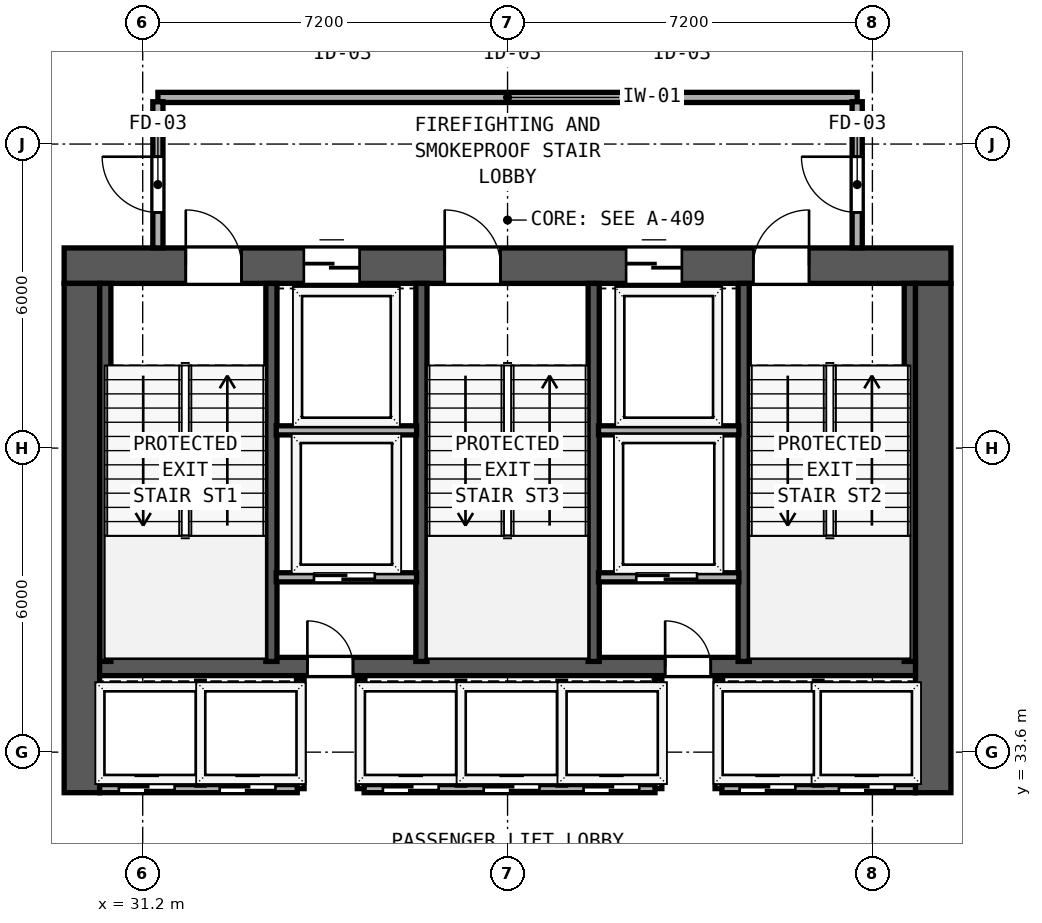
"""IFC4 building model, lengths in metres.
Left out: names, types, materials, properties, quantities, classifications, styles, units other than length and angle.
Written with IfcOpenShell. Run it as: python <this file> out.ifc"""

import sys

from ifc_helpers import new_model, si_unit, direction, frame, frame_2d, origin, place, context, subcontext, project, spatial, rectangle, extrude, element, fill, save


model = new_model("IFC4")
c1 = context("Model", 3, precision=1e-05, world=origin(), true_north=direction((0.0, 1.0)))
c2 = subcontext(c1, "Body", "Model", "MODEL_VIEW")
j1 = project(units=[si_unit("LENGTHUNIT", "METRE"), si_unit("PLANEANGLEUNIT", "RADIAN")], contexts=[c1])
p1 = place(None, origin())
s1 = spatial("IfcSite", under=j1, at=p1, CompositionType="ELEMENT")
p2 = place(p1, origin())
s2 = spatial("IfcBuilding", under=s1, at=p2, CompositionType="ELEMENT")
p3 = place(p2, frame((0.0, 0.0, 94.0)))
s3 = spatial("IfcBuildingStorey", under=s2, at=p3, CompositionType="ELEMENT", Elevation=94.0)
p4 = place(p3, frame((29.65, 43.2, 0.0), z_axis=(0.0, 0.0, 1.0), x_axis=(1.0, 0.0, 0.0)))
e1 = element("IfcWall", 1, at=p4, inside=s3, PredefinedType="SHEAR", context=c2, shape_type="SweptSolid", body=[
    extrude(rectangle(XDim=17.5, YDim=0.7, at=frame_2d((8.75, 0.0))), origin(), (0.0, 0.0, 1.0), 4.2),
])
p5 = place(p4, frame((2.4, 0.0, 0.0)))
e2 = element("IfcOpeningElement", 2, at=p5, cuts=e1, PredefinedType="OPENING", context=c2, shape_type="SweptSolid", body=[
    extrude(rectangle(XDim=1.1, YDim=2.15, at=frame_2d((0.55, 1.075))), frame((0.0, 0.36, 0.0), z_axis=(0.0, -1.0, 0.0), x_axis=(1.0, 0.0, 0.0)), (0.0, 0.0, 1.0), 0.72),
])
p6 = place(p4, frame((7.51, 0.0, 0.0)))
e3 = element("IfcOpeningElement", 3, at=p6, cuts=e1, PredefinedType="OPENING", context=c2, shape_type="SweptSolid", body=[
    extrude(rectangle(XDim=1.1, YDim=2.15, at=frame_2d((0.55, 1.075))), frame((0.0, 0.36, 0.0), z_axis=(0.0, -1.0, 0.0), x_axis=(1.0, 0.0, 0.0)), (0.0, 0.0, 1.0), 0.72),
])
p7 = place(p4, frame((13.6, 0.0, 0.0)))
e4 = element("IfcOpeningElement", 4, at=p7, cuts=e1, PredefinedType="OPENING", context=c2, shape_type="SweptSolid", body=[
    extrude(rectangle(XDim=1.1, YDim=2.15, at=frame_2d((0.55, 1.075))), frame((0.0, 0.36, 0.0), z_axis=(0.0, -1.0, 0.0), x_axis=(1.0, 0.0, 0.0)), (0.0, 0.0, 1.0), 0.72),
])
p8 = place(p4, frame((4.73, 0.0, 0.0)))
e5 = element("IfcOpeningElement", 5, at=p8, cuts=e1, PredefinedType="OPENING", context=c2, shape_type="SweptSolid", body=[
    extrude(rectangle(XDim=1.1, YDim=2.2, at=frame_2d((0.55, 1.1))), frame((0.0, 0.36, 0.0), z_axis=(0.0, -1.0, 0.0), x_axis=(1.0, 0.0, 0.0)), (0.0, 0.0, 1.0), 0.72),
])
p9 = place(p4, frame((11.09, 0.0, 0.0)))
e6 = element("IfcOpeningElement", 6, at=p9, cuts=e1, PredefinedType="OPENING", context=c2, shape_type="SweptSolid", body=[
    extrude(rectangle(XDim=1.1, YDim=2.2, at=frame_2d((0.55, 1.1))), frame((0.0, 0.36, 0.0), z_axis=(0.0, -1.0, 0.0), x_axis=(1.0, 0.0, 0.0)), (0.0, 0.0, 1.0), 0.72),
])
for number, where, z_axis, x_axis in (
    (7, (30.0, 32.8, 0.0), (0.0, 0.0, 1.0), (0.0, 1.0, 0.0)),
    (8, (46.8, 32.8, 0.0), (0.0, 0.0, 1.0), (0.0, 1.0, 0.0)),
):
    element("IfcWall", number, at=place(p3, frame(where, z_axis=z_axis, x_axis=x_axis)), inside=s3, PredefinedType="SHEAR", context=c2, shape_type="SweptSolid", body=[
        extrude(rectangle(XDim=10.05, YDim=0.7, at=frame_2d((5.025, 0.0))), origin(), (0.0, 0.0, 1.0), 4.2),
    ])
p10 = place(p3, frame((30.35, 35.29, 0.0), z_axis=(0.0, 0.0, 1.0), x_axis=(1.0, 0.0, 0.0)))
e9 = element("IfcWall", 9, at=p10, inside=s3, PredefinedType="SHEAR", context=c2, shape_type="SweptSolid", body=[
    extrude(rectangle(XDim=16.1, YDim=0.36, at=frame_2d((8.05, 0.0))), origin(), (0.0, 0.0, 1.0), 4.2),
])
p11 = place(p10, frame((5.0, 0.0, 0.0), z_axis=(0.0, 0.0, 1.0), x_axis=(-1.0, 0.0, 0.0)))
e10 = element("IfcOpeningElement", 10, at=p11, cuts=e9, PredefinedType="OPENING", context=c2, shape_type="SweptSolid", body=[
    extrude(rectangle(XDim=0.9, YDim=2.1, at=frame_2d((0.45, 1.05))), frame((0.0, 0.19, 0.0), z_axis=(0.0, -1.0, 0.0), x_axis=(1.0, 0.0, 0.0)), (0.0, 0.0, 1.0), 0.38),
])
p12 = place(p10, frame((12.06, 0.0, 0.0), z_axis=(0.0, 0.0, 1.0), x_axis=(-1.0, 0.0, 0.0)))
e11 = element("IfcOpeningElement", 11, at=p12, cuts=e9, PredefinedType="OPENING", context=c2, shape_type="SweptSolid", body=[
    extrude(rectangle(XDim=0.9, YDim=2.1, at=frame_2d((0.45, 1.05))), frame((0.0, 0.19, 0.0), z_axis=(0.0, -1.0, 0.0), x_axis=(1.0, 0.0, 0.0)), (0.0, 0.0, 1.0), 0.38),
])
for number, where, z_axis, x_axis in (
    (12, (30.462, 35.39, 0.0), (0.0, 0.0, 1.0), (0.0, 1.0, 0.0)),
    (13, (33.74, 35.39, 0.0), (0.0, 0.0, 1.0), (0.0, 1.0, 0.0)),
    (14, (36.7, 35.39, 0.0), (0.0, 0.0, 1.0), (0.0, 1.0, 0.0)),
    (15, (40.1, 35.39, 0.0), (0.0, 0.0, 1.0), (0.0, 1.0, 0.0)),
    (16, (43.06, 35.39, 0.0), (0.0, 0.0, 1.0), (0.0, 1.0, 0.0)),
    (17, (46.338, 35.39, 0.0), (0.0, 0.0, 1.0), (0.0, 1.0, 0.0)),
):
    element("IfcWall", number, at=place(p3, frame(where, z_axis=z_axis, x_axis=x_axis)), inside=s3, PredefinedType="SHEAR", context=c2, shape_type="SweptSolid", body=[
        extrude(rectangle(XDim=7.46, YDim=0.22, at=frame_2d((3.73, 0.0))), origin(), (0.0, 0.0, 1.0), 4.2),
    ])
p13 = place(p3, frame((31.5, 46.52, 0.0), z_axis=(0.0, 0.0, 1.0), x_axis=(1.0, 0.0, 0.0)))
e18 = element("IfcWall", 18, at=p13, inside=s3, PredefinedType="SOLIDWALL", context=c2, shape_type="SweptSolid", body=[
    extrude(rectangle(XDim=13.8, YDim=0.2, at=frame_2d((6.9, 0.0))), origin(), (0.0, 0.0, 1.0), 4.2),
])
p14 = place(p3, frame((31.5, 43.55, 0.0), z_axis=(0.0, 0.0, 1.0), x_axis=(0.0, 1.0, 0.0)))
e19 = element("IfcWall", 19, at=p14, inside=s3, PredefinedType="SOLIDWALL", context=c2, shape_type="SweptSolid", body=[
    extrude(rectangle(XDim=2.885, YDim=0.2, at=frame_2d((1.442, 0.0))), origin(), (0.0, 0.0, 1.0), 4.2),
])
p15 = place(p14, frame((1.8, 0.0, 0.0), z_axis=(0.0, 0.0, 1.0), x_axis=(-1.0, 0.0, 0.0)))
e20 = element("IfcOpeningElement", 20, at=p15, cuts=e19, PredefinedType="OPENING", context=c2, shape_type="SweptSolid", body=[
    extrude(rectangle(XDim=1.1, YDim=2.15, at=frame_2d((0.55, 1.075))), frame((0.0, 0.11, 0.0), z_axis=(0.0, -1.0, 0.0), x_axis=(1.0, 0.0, 0.0)), (0.0, 0.0, 1.0), 0.22),
])
p16 = place(p3, frame((45.3, 43.55, 0.0), z_axis=(0.0, 0.0, 1.0), x_axis=(0.0, 1.0, 0.0)))
e21 = element("IfcWall", 21, at=p16, inside=s3, PredefinedType="SOLIDWALL", context=c2, shape_type="SweptSolid", body=[
    extrude(rectangle(XDim=2.885, YDim=0.2, at=frame_2d((1.442, 0.0))), origin(), (0.0, 0.0, 1.0), 4.2),
])
p17 = place(p16, frame((0.7, 0.0, 0.0)))
e22 = element("IfcOpeningElement", 22, at=p17, cuts=e21, PredefinedType="OPENING", context=c2, shape_type="SweptSolid", body=[
    extrude(rectangle(XDim=1.1, YDim=2.15, at=frame_2d((0.55, 1.075))), frame((0.0, 0.11, 0.0), z_axis=(0.0, -1.0, 0.0), x_axis=(1.0, 0.0, 0.0)), (0.0, 0.0, 1.0), 0.22),
])
for number, where, z_axis, x_axis in (
    (23, (33.835, 39.95, 0.0), (0.0, 0.0, 1.0), (1.0, 0.0, 0.0)),
    (24, (40.195, 39.95, 0.0), (0.0, 0.0, 1.0), (1.0, 0.0, 0.0)),
):
    element("IfcWall", number, at=place(p3, frame(where, z_axis=z_axis, x_axis=x_axis)), inside=s3, PredefinedType="SOLIDWALL", context=c2, shape_type="SweptSolid", body=[
        extrude(rectangle(XDim=2.77, YDim=0.18, at=frame_2d((1.385, 0.0))), origin(), (0.0, 0.0, 1.0), 4.2),
    ])
p18 = place(p3, frame((33.835, 37.05, 0.0), z_axis=(0.0, 0.0, 1.0), x_axis=(1.0, 0.0, 0.0)))
e25 = element("IfcWall", 25, at=p18, inside=s3, PredefinedType="SOLIDWALL", context=c2, shape_type="SweptSolid", body=[
    extrude(rectangle(XDim=2.77, YDim=0.18, at=frame_2d((1.385, 0.0))), origin(), (0.0, 0.0, 1.0), 4.2),
])
p19 = place(p18, frame((1.945, 0.0, 0.0), z_axis=(0.0, 0.0, 1.0), x_axis=(-1.0, 0.0, 0.0)))
e26 = element("IfcOpeningElement", 26, at=p19, cuts=e25, PredefinedType="OPENING", context=c2, shape_type="SweptSolid", body=[
    extrude(rectangle(XDim=1.2, YDim=2.2, at=frame_2d((0.6, 1.1))), frame((0.0, 0.1, 0.0), z_axis=(0.0, -1.0, 0.0), x_axis=(1.0, 0.0, 0.0)), (0.0, 0.0, 1.0), 0.2),
])
for number, where, z_axis, x_axis in (
    (27, (34.31, 32.88, 0.0), (0.0, 0.0, 1.0), (0.0, 1.0, 0.0)),
    (28, (35.51, 32.88, 0.0), (0.0, 0.0, 1.0), (0.0, 1.0, 0.0)),
):
    element("IfcWall", number, at=place(p3, frame(where, z_axis=z_axis, x_axis=x_axis)), inside=s3, PredefinedType="SOLIDWALL", context=c2, shape_type="SweptSolid", body=[
        extrude(rectangle(XDim=2.17, YDim=0.15, at=frame_2d((1.085, 0.0))), origin(), (0.0, 0.0, 1.0), 4.2),
    ])
p20 = place(p3, frame((40.195, 37.05, 0.0), z_axis=(0.0, 0.0, 1.0), x_axis=(1.0, 0.0, 0.0)))
e29 = element("IfcWall", 29, at=p20, inside=s3, PredefinedType="SOLIDWALL", context=c2, shape_type="SweptSolid", body=[
    extrude(rectangle(XDim=2.77, YDim=0.18, at=frame_2d((1.385, 0.0))), origin(), (0.0, 0.0, 1.0), 4.2),
])
p21 = place(p20, frame((1.945, 0.0, 0.0), z_axis=(0.0, 0.0, 1.0), x_axis=(-1.0, 0.0, 0.0)))
e30 = element("IfcOpeningElement", 30, at=p21, cuts=e29, PredefinedType="OPENING", context=c2, shape_type="SweptSolid", body=[
    extrude(rectangle(XDim=1.2, YDim=2.2, at=frame_2d((0.6, 1.1))), frame((0.0, 0.1, 0.0), z_axis=(0.0, -1.0, 0.0), x_axis=(1.0, 0.0, 0.0)), (0.0, 0.0, 1.0), 0.2),
])
for number, where, z_axis, x_axis in (
    (31, (41.37, 32.88, 0.0), (0.0, 0.0, 1.0), (0.0, 1.0, 0.0)),
    (32, (42.57, 32.88, 0.0), (0.0, 0.0, 1.0), (0.0, 1.0, 0.0)),
):
    element("IfcWall", number, at=place(p3, frame(where, z_axis=z_axis, x_axis=x_axis)), inside=s3, PredefinedType="SOLIDWALL", context=c2, shape_type="SweptSolid", body=[
        extrude(rectangle(XDim=2.17, YDim=0.15, at=frame_2d((1.085, 0.0))), origin(), (0.0, 0.0, 1.0), 4.2),
    ])
p22 = place(p3, frame((30.35, 32.88, 0.0), z_axis=(0.0, 0.0, 1.0), x_axis=(1.0, 0.0, 0.0)))
e33 = element("IfcWall", 33, at=p22, inside=s3, PredefinedType="SOLIDWALL", context=c2, shape_type="SweptSolid", body=[
    extrude(rectangle(XDim=3.9, YDim=0.16, at=frame_2d((1.95, 0.0))), origin(), (0.0, 0.0, 1.0), 4.2),
])
p23 = place(p22, frame((1.48, 0.0, 0.0), z_axis=(0.0, 0.0, 1.0), x_axis=(-1.0, 0.0, 0.0)))
e34 = element("IfcOpeningElement", 34, at=p23, cuts=e33, PredefinedType="OPENING", context=c2, shape_type="SweptSolid", body=[
    extrude(rectangle(XDim=1.1, YDim=2.2, at=frame_2d((0.55, 1.1))), frame((0.0, 0.09, 0.0), z_axis=(0.0, -1.0, 0.0), x_axis=(1.0, 0.0, 0.0)), (0.0, 0.0, 1.0), 0.18),
])
p24 = place(p22, frame((3.47, 0.0, 0.0), z_axis=(0.0, 0.0, 1.0), x_axis=(-1.0, 0.0, 0.0)))
e35 = element("IfcOpeningElement", 35, at=p24, cuts=e33, PredefinedType="OPENING", context=c2, shape_type="SweptSolid", body=[
    extrude(rectangle(XDim=1.1, YDim=2.2, at=frame_2d((0.55, 1.1))), frame((0.0, 0.09, 0.0), z_axis=(0.0, -1.0, 0.0), x_axis=(1.0, 0.0, 0.0)), (0.0, 0.0, 1.0), 0.18),
])
p25 = place(p3, frame((35.57, 32.88, 0.0), z_axis=(0.0, 0.0, 1.0), x_axis=(1.0, 0.0, 0.0)))
e36 = element("IfcWall", 36, at=p25, inside=s3, PredefinedType="SOLIDWALL", context=c2, shape_type="SweptSolid", body=[
    extrude(rectangle(XDim=5.74, YDim=0.16, at=frame_2d((2.87, 0.0))), origin(), (0.0, 0.0, 1.0), 4.2),
])
p26 = place(p25, frame((1.47, 0.0, 0.0), z_axis=(0.0, 0.0, 1.0), x_axis=(-1.0, 0.0, 0.0)))
e37 = element("IfcOpeningElement", 37, at=p26, cuts=e36, PredefinedType="OPENING", context=c2, shape_type="SweptSolid", body=[
    extrude(rectangle(XDim=1.1, YDim=2.2, at=frame_2d((0.55, 1.1))), frame((0.0, 0.09, 0.0), z_axis=(0.0, -1.0, 0.0), x_axis=(1.0, 0.0, 0.0)), (0.0, 0.0, 1.0), 0.18),
])
p27 = place(p25, frame((3.46, 0.0, 0.0), z_axis=(0.0, 0.0, 1.0), x_axis=(-1.0, 0.0, 0.0)))
e38 = element("IfcOpeningElement", 38, at=p27, cuts=e36, PredefinedType="OPENING", context=c2, shape_type="SweptSolid", body=[
    extrude(rectangle(XDim=1.1, YDim=2.2, at=frame_2d((0.55, 1.1))), frame((0.0, 0.09, 0.0), z_axis=(0.0, -1.0, 0.0), x_axis=(1.0, 0.0, 0.0)), (0.0, 0.0, 1.0), 0.18),
])
p28 = place(p25, frame((5.43, 0.0, 0.0), z_axis=(0.0, 0.0, 1.0), x_axis=(-1.0, 0.0, 0.0)))
e39 = element("IfcOpeningElement", 39, at=p28, cuts=e36, PredefinedType="OPENING", context=c2, shape_type="SweptSolid", body=[
    extrude(rectangle(XDim=1.1, YDim=2.2, at=frame_2d((0.55, 1.1))), frame((0.0, 0.09, 0.0), z_axis=(0.0, -1.0, 0.0), x_axis=(1.0, 0.0, 0.0)), (0.0, 0.0, 1.0), 0.18),
])
p29 = place(p3, frame((42.63, 32.88, 0.0), z_axis=(0.0, 0.0, 1.0), x_axis=(1.0, 0.0, 0.0)))
e40 = element("IfcWall", 40, at=p29, inside=s3, PredefinedType="SOLIDWALL", context=c2, shape_type="SweptSolid", body=[
    extrude(rectangle(XDim=3.82, YDim=0.16, at=frame_2d((1.91, 0.0))), origin(), (0.0, 0.0, 1.0), 4.2),
])
p30 = place(p29, frame((1.45, 0.0, 0.0), z_axis=(0.0, 0.0, 1.0), x_axis=(-1.0, 0.0, 0.0)))
e41 = element("IfcOpeningElement", 41, at=p30, cuts=e40, PredefinedType="OPENING", context=c2, shape_type="SweptSolid", body=[
    extrude(rectangle(XDim=1.1, YDim=2.2, at=frame_2d((0.55, 1.1))), frame((0.0, 0.09, 0.0), z_axis=(0.0, -1.0, 0.0), x_axis=(1.0, 0.0, 0.0)), (0.0, 0.0, 1.0), 0.18),
])
p31 = place(p29, frame((3.41, 0.0, 0.0), z_axis=(0.0, 0.0, 1.0), x_axis=(-1.0, 0.0, 0.0)))
e42 = element("IfcOpeningElement", 42, at=p31, cuts=e40, PredefinedType="OPENING", context=c2, shape_type="SweptSolid", body=[
    extrude(rectangle(XDim=1.1, YDim=2.2, at=frame_2d((0.55, 1.1))), frame((0.0, 0.09, 0.0), z_axis=(0.0, -1.0, 0.0), x_axis=(1.0, 0.0, 0.0)), (0.0, 0.0, 1.0), 0.18),
])
for number, where, z_axis, x_axis in (
    (43, (32.34, 32.95, 0.0), (0.0, 0.0, 1.0), (0.0, 1.0, 0.0)),
    (44, (37.48, 32.95, 0.0), (0.0, 0.0, 1.0), (0.0, 1.0, 0.0)),
    (45, (39.47, 32.95, 0.0), (0.0, 0.0, 1.0), (0.0, 1.0, 0.0)),
    (46, (44.53, 32.95, 0.0), (0.0, 0.0, 1.0), (0.0, 1.0, 0.0)),
):
    element("IfcWall", number, at=place(p3, frame(where, z_axis=z_axis, x_axis=x_axis)), inside=s3, PredefinedType="SOLIDWALL", context=c2, shape_type="SweptSolid", body=[
        extrude(rectangle(XDim=2.05, YDim=0.15, at=frame_2d((1.025, 0.0))), origin(), (0.0, 0.0, 1.0), 4.2),
    ])
p32 = place(p5, origin())
e47 = element("IfcDoor", 47, at=p32, inside=s3, OperationType="SINGLE_SWING_LEFT", PredefinedType="DOOR", context=c2, shape_type="SweptSolid", body=[
    extrude(rectangle(XDim=1.1, YDim=2.15, at=frame_2d((0.55, 1.075))), frame((0.0, 0.185, 0.0), z_axis=(0.0, -1.0, 0.0), x_axis=(1.0, 0.0, 0.0)), (0.0, 0.0, 1.0), 0.05),
])
fill(e2, e47)
p33 = place(p6, origin())
e48 = element("IfcDoor", 48, at=p33, inside=s3, OperationType="SINGLE_SWING_LEFT", PredefinedType="DOOR", context=c2, shape_type="SweptSolid", body=[
    extrude(rectangle(XDim=1.1, YDim=2.15, at=frame_2d((0.55, 1.075))), frame((0.0, 0.185, 0.0), z_axis=(0.0, -1.0, 0.0), x_axis=(1.0, 0.0, 0.0)), (0.0, 0.0, 1.0), 0.05),
])
fill(e3, e48)
p34 = place(p7, origin())
e49 = element("IfcDoor", 49, at=p34, inside=s3, OperationType="SINGLE_SWING_RIGHT", PredefinedType="DOOR", context=c2, shape_type="SweptSolid", body=[
    extrude(rectangle(XDim=1.1, YDim=2.15, at=frame_2d((0.55, 1.075))), frame((0.0, 0.185, 0.0), z_axis=(0.0, -1.0, 0.0), x_axis=(1.0, 0.0, 0.0)), (0.0, 0.0, 1.0), 0.05),
])
fill(e4, e49)
p35 = place(p15, origin())
e50 = element("IfcDoor", 50, at=p35, inside=s3, OperationType="SINGLE_SWING_LEFT", PredefinedType="DOOR", context=c2, shape_type="SweptSolid", body=[
    extrude(rectangle(XDim=1.1, YDim=2.15, at=frame_2d((0.55, 1.075))), frame((0.0, 0.025, 0.0), z_axis=(0.0, -1.0, 0.0), x_axis=(1.0, 0.0, 0.0)), (0.0, 0.0, 1.0), 0.05),
])
fill(e20, e50)
p36 = place(p17, origin())
e51 = element("IfcDoor", 51, at=p36, inside=s3, OperationType="SINGLE_SWING_RIGHT", PredefinedType="DOOR", context=c2, shape_type="SweptSolid", body=[
    extrude(rectangle(XDim=1.1, YDim=2.15, at=frame_2d((0.55, 1.075))), frame((0.0, 0.025, 0.0), z_axis=(0.0, -1.0, 0.0), x_axis=(1.0, 0.0, 0.0)), (0.0, 0.0, 1.0), 0.05),
])
fill(e22, e51)
p37 = place(p8, origin())
e52 = element("IfcDoor", 52, at=p37, inside=s3, OperationType="SLIDING_TO_LEFT", PredefinedType="DOOR", context=c2, shape_type="SweptSolid", body=[
    extrude(rectangle(XDim=1.1, YDim=2.2, at=frame_2d((0.55, 1.1))), frame((0.0, 0.185, 0.0), z_axis=(0.0, -1.0, 0.0), x_axis=(1.0, 0.0, 0.0)), (0.0, 0.0, 1.0), 0.05),
])
fill(e5, e52)
p38 = place(p9, origin())
e53 = element("IfcDoor", 53, at=p38, inside=s3, OperationType="SLIDING_TO_LEFT", PredefinedType="DOOR", context=c2, shape_type="SweptSolid", body=[
    extrude(rectangle(XDim=1.1, YDim=2.2, at=frame_2d((0.55, 1.1))), frame((0.0, 0.185, 0.0), z_axis=(0.0, -1.0, 0.0), x_axis=(1.0, 0.0, 0.0)), (0.0, 0.0, 1.0), 0.05),
])
fill(e6, e53)
p39 = place(p19, origin())
e54 = element("IfcDoor", 54, at=p39, inside=s3, OperationType="SLIDING_TO_RIGHT", PredefinedType="DOOR", context=c2, shape_type="SweptSolid", body=[
    extrude(rectangle(XDim=1.2, YDim=2.2, at=frame_2d((0.6, 1.1))), frame((0.0, 0.025, 0.0), z_axis=(0.0, -1.0, 0.0), x_axis=(1.0, 0.0, 0.0)), (0.0, 0.0, 1.0), 0.05),
])
fill(e26, e54)
p40 = place(p11, origin())
e55 = element("IfcDoor", 55, at=p40, inside=s3, OperationType="SINGLE_SWING_RIGHT", PredefinedType="DOOR", context=c2, shape_type="SweptSolid", body=[
    extrude(rectangle(XDim=0.9, YDim=2.1, at=frame_2d((0.45, 1.05))), frame((0.0, 0.025, 0.0), z_axis=(0.0, -1.0, 0.0), x_axis=(1.0, 0.0, 0.0)), (0.0, 0.0, 1.0), 0.05),
])
fill(e10, e55)
p41 = place(p21, origin())
e56 = element("IfcDoor", 56, at=p41, inside=s3, OperationType="SLIDING_TO_RIGHT", PredefinedType="DOOR", context=c2, shape_type="SweptSolid", body=[
    extrude(rectangle(XDim=1.2, YDim=2.2, at=frame_2d((0.6, 1.1))), frame((0.0, 0.025, 0.0), z_axis=(0.0, -1.0, 0.0), x_axis=(1.0, 0.0, 0.0)), (0.0, 0.0, 1.0), 0.05),
])
fill(e30, e56)
p42 = place(p12, origin())
e57 = element("IfcDoor", 57, at=p42, inside=s3, OperationType="SINGLE_SWING_RIGHT", PredefinedType="DOOR", context=c2, shape_type="SweptSolid", body=[
    extrude(rectangle(XDim=0.9, YDim=2.1, at=frame_2d((0.45, 1.05))), frame((0.0, 0.025, 0.0), z_axis=(0.0, -1.0, 0.0), x_axis=(1.0, 0.0, 0.0)), (0.0, 0.0, 1.0), 0.05),
])
fill(e11, e57)
p43 = place(p23, origin())
e58 = element("IfcDoor", 58, at=p43, inside=s3, OperationType="SLIDING_TO_LEFT", PredefinedType="DOOR", context=c2, shape_type="SweptSolid", body=[
    extrude(rectangle(XDim=1.1, YDim=2.2, at=frame_2d((0.55, 1.1))), frame((0.0, 0.025, 0.0), z_axis=(0.0, -1.0, 0.0), x_axis=(1.0, 0.0, 0.0)), (0.0, 0.0, 1.0), 0.05),
])
fill(e34, e58)
p44 = place(p24, origin())
e59 = element("IfcDoor", 59, at=p44, inside=s3, OperationType="SLIDING_TO_LEFT", PredefinedType="DOOR", context=c2, shape_type="SweptSolid", body=[
    extrude(rectangle(XDim=1.1, YDim=2.2, at=frame_2d((0.55, 1.1))), frame((0.0, 0.025, 0.0), z_axis=(0.0, -1.0, 0.0), x_axis=(1.0, 0.0, 0.0)), (0.0, 0.0, 1.0), 0.05),
])
fill(e35, e59)
p45 = place(p26, origin())
e60 = element("IfcDoor", 60, at=p45, inside=s3, OperationType="SLIDING_TO_LEFT", PredefinedType="DOOR", context=c2, shape_type="SweptSolid", body=[
    extrude(rectangle(XDim=1.1, YDim=2.2, at=frame_2d((0.55, 1.1))), frame((0.0, 0.025, 0.0), z_axis=(0.0, -1.0, 0.0), x_axis=(1.0, 0.0, 0.0)), (0.0, 0.0, 1.0), 0.05),
])
fill(e37, e60)
p46 = place(p27, origin())
e61 = element("IfcDoor", 61, at=p46, inside=s3, OperationType="SLIDING_TO_LEFT", PredefinedType="DOOR", context=c2, shape_type="SweptSolid", body=[
    extrude(rectangle(XDim=1.1, YDim=2.2, at=frame_2d((0.55, 1.1))), frame((0.0, 0.025, 0.0), z_axis=(0.0, -1.0, 0.0), x_axis=(1.0, 0.0, 0.0)), (0.0, 0.0, 1.0), 0.05),
])
fill(e38, e61)
p47 = place(p28, origin())
e62 = element("IfcDoor", 62, at=p47, inside=s3, OperationType="SLIDING_TO_RIGHT", PredefinedType="DOOR", context=c2, shape_type="SweptSolid", body=[
    extrude(rectangle(XDim=1.1, YDim=2.2, at=frame_2d((0.55, 1.1))), frame((0.0, 0.025, 0.0), z_axis=(0.0, -1.0, 0.0), x_axis=(1.0, 0.0, 0.0)), (0.0, 0.0, 1.0), 0.05),
])
fill(e39, e62)
p48 = place(p30, origin())
e63 = element("IfcDoor", 63, at=p48, inside=s3, OperationType="SLIDING_TO_RIGHT", PredefinedType="DOOR", context=c2, shape_type="SweptSolid", body=[
    extrude(rectangle(XDim=1.1, YDim=2.2, at=frame_2d((0.55, 1.1))), frame((0.0, 0.025, 0.0), z_axis=(0.0, -1.0, 0.0), x_axis=(1.0, 0.0, 0.0)), (0.0, 0.0, 1.0), 0.05),
])
fill(e41, e63)
p49 = place(p31, origin())
e64 = element("IfcDoor", 64, at=p49, inside=s3, OperationType="SLIDING_TO_RIGHT", PredefinedType="DOOR", context=c2, shape_type="SweptSolid", body=[
    extrude(rectangle(XDim=1.1, YDim=2.2, at=frame_2d((0.55, 1.1))), frame((0.0, 0.025, 0.0), z_axis=(0.0, -1.0, 0.0), x_axis=(1.0, 0.0, 0.0)), (0.0, 0.0, 1.0), 0.05),
])
fill(e42, e64)
save(model, sys.argv[1])
